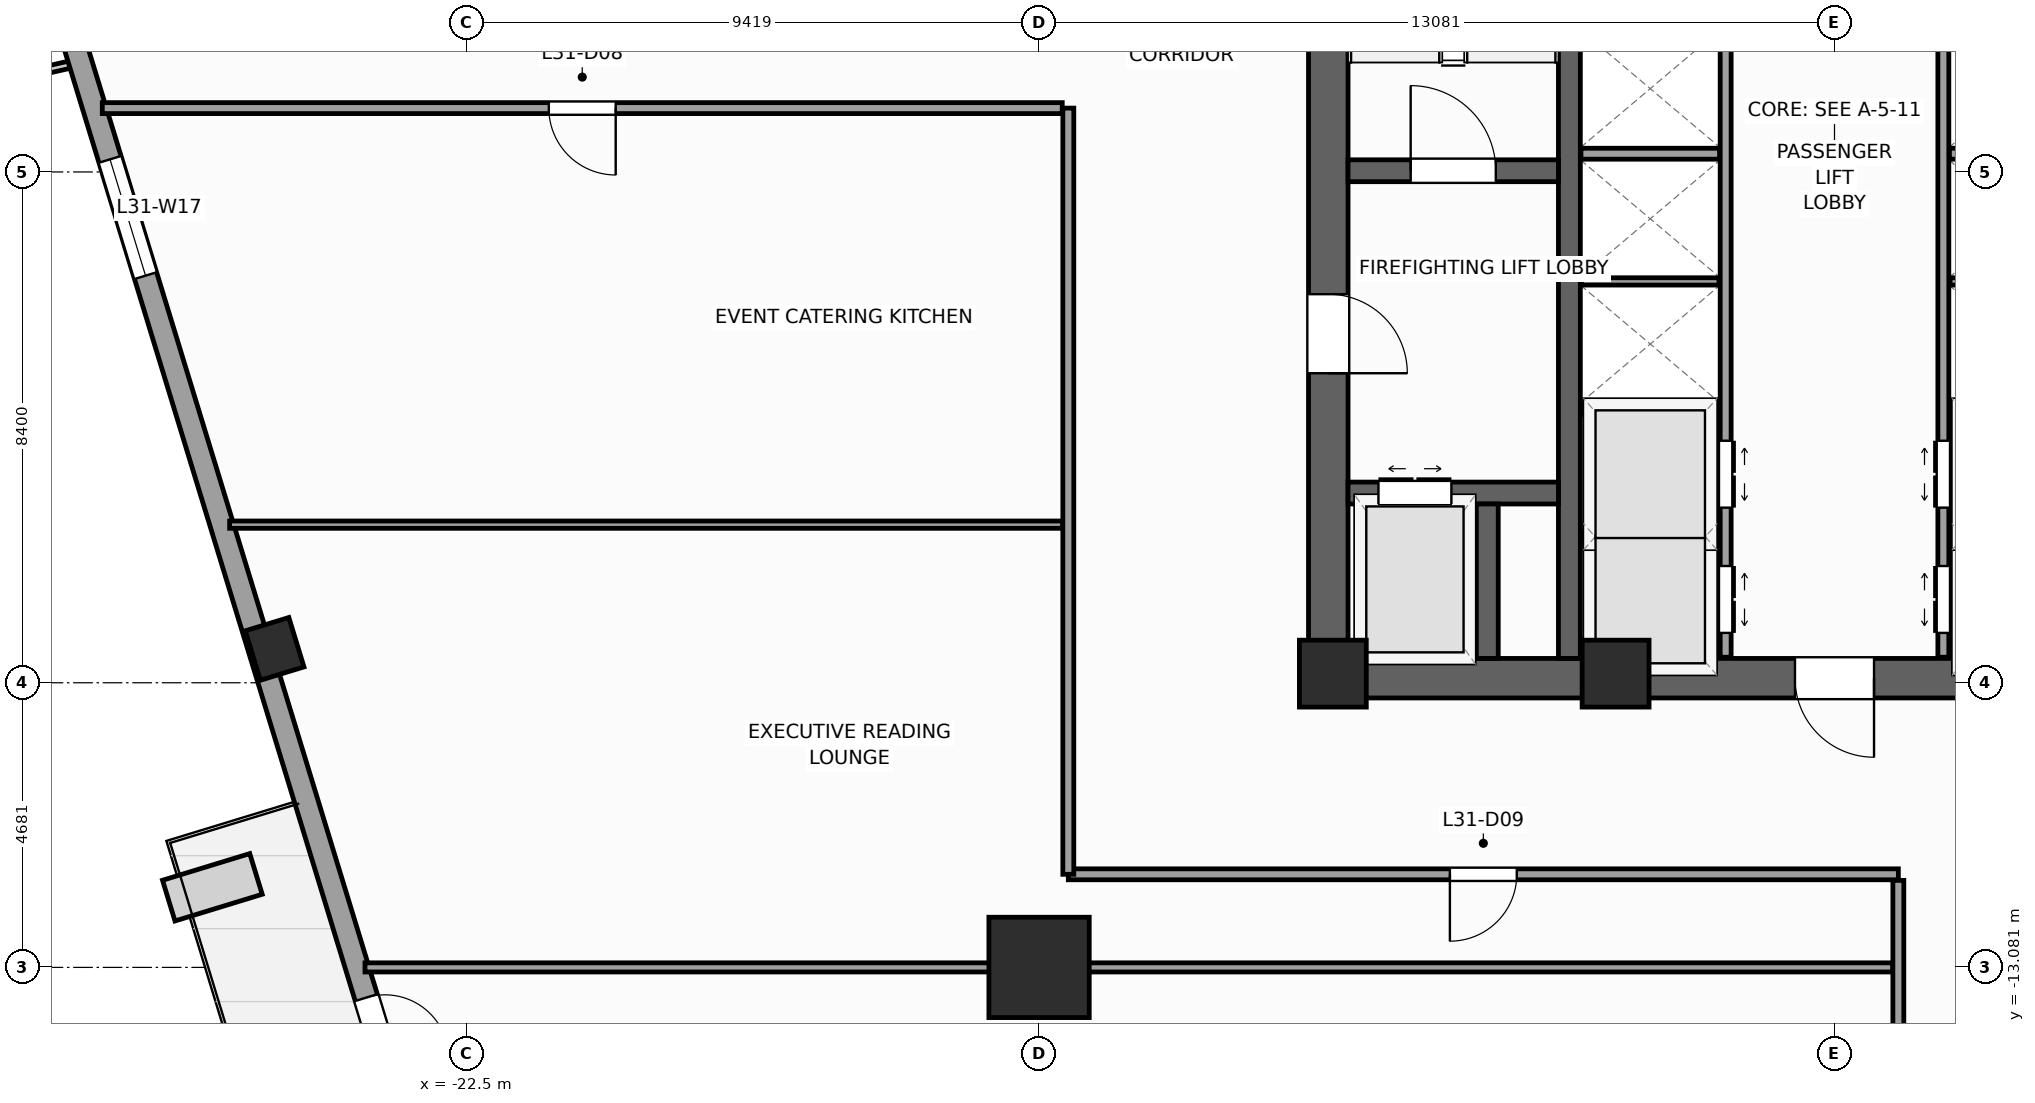
"""IFC4 building model, lengths in metres.
Left out: names, types, materials, properties, quantities, classifications, styles, units other than length and angle.
Written with IfcOpenShell. Run it as: python <this file> out.ifc"""

import sys

from ifc_helpers import new_model, si_unit, direction, frame, frame_2d, origin, origin_2d, place, context, subcontext, project, spatial, rectangle, extrude, source, transform, mapped, element, fill, save


model = new_model("IFC4")
c1 = context("Model", 3, precision=1e-05, world=origin(), true_north=direction((0.0, 1.0)))
c2 = subcontext(c1, "Body", "Model", "MODEL_VIEW")
j1 = project(units=[si_unit("LENGTHUNIT", "METRE"), si_unit("PLANEANGLEUNIT", "RADIAN")], contexts=[c1])
p1 = place(None, origin())
s1 = spatial("IfcSite", under=j1, at=p1, CompositionType="ELEMENT")
p2 = place(p1, origin())
s2 = spatial("IfcBuilding", under=s1, at=p2, CompositionType="ELEMENT")
p3 = place(p2, frame((0.0, 0.0, 131.2)))
s3 = spatial("IfcBuildingStorey", under=s2, at=p3, CompositionType="ELEMENT", Elevation=131.2)
p4 = place(p3, frame((-8.65, -8.325, 0.0), z_axis=(0.0, 0.0, 1.0), x_axis=(1.0, 0.0, 0.0)))
e1 = element("IfcWall", 1, at=p4, inside=s3, PredefinedType="SHEAR", context=c2, shape_type="SweptSolid", body=[
    extrude(rectangle(XDim=17.3, YDim=0.65, at=frame_2d((8.65, 0.0))), origin(), (0.0, 0.0, 1.0), 4.0),
])
p5 = place(p4, frame((8.0, 0.0, 0.0)))
e2 = element("IfcOpeningElement", 2, at=p5, cuts=e1, PredefinedType="OPENING", context=c2, shape_type="SweptSolid", body=[
    extrude(rectangle(XDim=1.3, YDim=2.2, at=frame_2d((0.65, 1.1))), frame((0.0, 0.335, 0.0), z_axis=(0.0, -1.0, 0.0), x_axis=(1.0, 0.0, 0.0)), (0.0, 0.0, 1.0), 0.67),
])
p6 = place(p3, frame((-8.325, -8.0, 0.0), z_axis=(0.0, 0.0, 1.0), x_axis=(0.0, 1.0, 0.0)))
e3 = element("IfcWall", 3, at=p6, inside=s3, PredefinedType="SHEAR", context=c2, shape_type="SweptSolid", body=[
    extrude(rectangle(XDim=16.0, YDim=0.65, at=frame_2d((8.0, 0.0))), origin(), (0.0, 0.0, 1.0), 4.0),
])
p7 = place(p6, frame((4.69, 0.0, 0.0)))
e4 = element("IfcOpeningElement", 4, at=p7, cuts=e3, PredefinedType="OPENING", context=c2, shape_type="SweptSolid", body=[
    extrude(rectangle(XDim=1.3, YDim=2.2, at=frame_2d((0.65, 1.1))), frame((0.0, 0.335, 0.0), z_axis=(0.0, -1.0, 0.0), x_axis=(1.0, 0.0, 0.0)), (0.0, 0.0, 1.0), 0.67),
])
p8 = place(p3, frame((-4.36, -8.0, 0.0), z_axis=(0.0, 0.0, 1.0), x_axis=(0.0, 1.0, 0.0)))
e5 = element("IfcWall", 5, at=p8, inside=s3, PredefinedType="SHEAR", context=c2, shape_type="SweptSolid", body=[
    extrude(rectangle(XDim=16.0, YDim=0.36, at=frame_2d((8.0, 0.0))), origin(), (0.0, 0.0, 1.0), 4.0),
])
p9 = place(p3, frame((-8.0, 0.02, 0.0), z_axis=(0.0, 0.0, 1.0), x_axis=(1.0, 0.0, 0.0)))
e6 = element("IfcWall", 6, at=p9, inside=s3, PredefinedType="SHEAR", context=c2, shape_type="SweptSolid", body=[
    extrude(rectangle(XDim=3.46, YDim=0.36, at=frame_2d((1.73, 0.0))), origin(), (0.0, 0.0, 1.0), 4.0),
])
p10 = place(p9, frame((1.03, 0.0, 0.0)))
e7 = element("IfcOpeningElement", 7, at=p10, cuts=e6, PredefinedType="OPENING", context=c2, shape_type="SweptSolid", body=[
    extrude(rectangle(XDim=1.4, YDim=2.2, at=frame_2d((0.7, 1.1))), frame((0.0, 0.19, 0.0), z_axis=(0.0, -1.0, 0.0), x_axis=(1.0, 0.0, 0.0)), (0.0, 0.0, 1.0), 0.38),
])
p11 = place(p3, frame((-8.0, -5.28, 0.0), z_axis=(0.0, 0.0, 1.0), x_axis=(1.0, 0.0, 0.0)))
e8 = element("IfcWall", 8, at=p11, inside=s3, PredefinedType="SHEAR", context=c2, shape_type="SweptSolid", body=[
    extrude(rectangle(XDim=3.46, YDim=0.36, at=frame_2d((1.73, 0.0))), origin(), (0.0, 0.0, 1.0), 4.0),
])
p12 = place(p11, frame((0.5, 0.0, 0.0)))
e9 = element("IfcOpeningElement", 9, at=p12, cuts=e8, PredefinedType="OPENING", context=c2, shape_type="SweptSolid", body=[
    extrude(rectangle(XDim=1.2, YDim=2.25, at=frame_2d((0.6, 1.125))), frame((0.0, 0.19, 0.0), z_axis=(0.0, -1.0, 0.0), x_axis=(1.0, 0.0, 0.0)), (0.0, 0.0, 1.0), 0.38),
])
p13 = place(p3, frame((-5.71, -8.0, 0.0), z_axis=(0.0, 0.0, 1.0), x_axis=(0.0, 1.0, 0.0)))
e10 = element("IfcWall", 10, at=p13, inside=s3, PredefinedType="SHEAR", context=c2, shape_type="SweptSolid", body=[
    extrude(rectangle(XDim=2.54, YDim=0.36, at=frame_2d((1.27, 0.0))), origin(), (0.0, 0.0, 1.0), 4.0),
])
m1 = source(origin(), c2, "Body", "SweptSolid", [
    extrude(rectangle(XDim=1.1, YDim=1.1, at=origin_2d()), origin(), (0.0, 0.0, 1.0), 4.0),
])
for number, where, z_axis, x_axis in (
    (11, (-8.25, -8.25, 0.0), (0.0, 0.0, 1.0), (1.0, 0.0, 0.0)),
    (12, (-3.6, -8.25, 0.0), (0.0, 0.0, 1.0), (1.0, 0.0, 0.0)),
):
    element("IfcColumn", number, at=place(p3, frame(where, z_axis=z_axis, x_axis=x_axis)), inside=s3, PredefinedType="PILASTER", context=c2, shape_type="MappedRepresentation", body=[
        mapped(m1, transform((0.0, 0.0, 0.0), scale=1.0)),
    ])
m2 = source(origin(), c2, "Body", "SweptSolid", [
    extrude(rectangle(XDim=1.65, YDim=1.65, at=origin_2d()), origin(), (0.0, 0.0, 1.0), 4.0),
])
p14 = place(p3, frame((-13.081, -13.081, 0.0), z_axis=(0.0, 0.0, 1.0), x_axis=(1.0, 0.0, 0.0)))
e13 = element("IfcColumn", 13, at=p14, inside=s3, PredefinedType="COLUMN", context=c2, shape_type="MappedRepresentation", body=[
    mapped(m2, transform((0.0, 0.0, 0.0), scale=1.0)),
])
m3 = source(origin(), c2, "Body", "SweptSolid", [
    extrude(rectangle(XDim=0.75, YDim=0.85, at=origin_2d()), origin(), (0.0, 0.0, 1.0), 4.0),
])
p15 = place(p3, frame((-25.653, -7.843, 0.0), z_axis=(0.0, 0.0, 1.0), x_axis=(0.956304755963, 0.292371704723, 0.0)))
e14 = element("IfcColumn", 14, at=p15, inside=s3, PredefinedType="COLUMN", context=c2, shape_type="MappedRepresentation", body=[
    mapped(m3, transform((0.0, 0.0, 0.0), scale=1.0)),
])
p16 = place(p3, frame((-32.658, 14.265, 0.0), z_axis=(0.0, 0.0, 1.0), x_axis=(0.292373127906, -0.956304320851, 0.0)))
e15 = element("IfcWall", 15, at=p16, inside=s3, PredefinedType="STANDARD", context=c2, shape_type="SweptSolid", body=[
    extrude(rectangle(XDim=46.38, YDim=0.38, at=frame_2d((23.19, 0.0))), origin(), (0.0, 0.0, 1.0), 3.14),
])
p17 = place(p16, frame((29.115, 0.0, 0.0)))
e16 = element("IfcOpeningElement", 16, at=p17, cuts=e15, PredefinedType="OPENING", context=c2, shape_type="SweptSolid", body=[
    extrude(rectangle(XDim=1.05, YDim=2.25, at=frame_2d((0.525, 1.125))), frame((0.0, 0.2, 0.0), z_axis=(0.0, -1.0, 0.0), x_axis=(1.0, 0.0, 0.0)), (0.0, 0.0, 1.0), 0.4),
])
p18 = place(p16, frame((4.865, 0.0, 0.51)))
e17 = element("IfcOpeningElement", 17, at=p18, cuts=e15, PredefinedType="OPENING", context=c2, shape_type="SweptSolid", body=[
    extrude(rectangle(XDim=1.4, YDim=2.4, at=frame_2d((0.7, 1.2))), frame((0.0, 0.2, 0.0), z_axis=(0.0, -1.0, 0.0), x_axis=(1.0, 0.0, 0.0)), (0.0, 0.0, 1.0), 0.4),
])
p19 = place(p16, frame((14.7, 0.0, 0.51)))
e18 = element("IfcOpeningElement", 18, at=p19, cuts=e15, PredefinedType="OPENING", context=c2, shape_type="SweptSolid", body=[
    extrude(rectangle(XDim=2.0, YDim=2.4, at=frame_2d((1.0, 1.2))), frame((0.0, 0.2, 0.0), z_axis=(0.0, -1.0, 0.0), x_axis=(1.0, 0.0, 0.0)), (0.0, 0.0, 1.0), 0.4),
])
p20 = place(p16, frame((31.288, 0.0, 0.51)))
e19 = element("IfcOpeningElement", 19, at=p20, cuts=e15, PredefinedType="OPENING", context=c2, shape_type="SweptSolid", body=[
    extrude(rectangle(XDim=2.0, YDim=2.4, at=frame_2d((1.0, 1.2))), frame((0.0, 0.2, 0.0), z_axis=(0.0, -1.0, 0.0), x_axis=(1.0, 0.0, 0.0)), (0.0, 0.0, 1.0), 0.4),
])
p21 = place(p16, frame((39.187, 0.0, 0.51)))
e20 = element("IfcOpeningElement", 20, at=p21, cuts=e15, PredefinedType="OPENING", context=c2, shape_type="SweptSolid", body=[
    extrude(rectangle(XDim=1.4, YDim=2.4, at=frame_2d((0.7, 1.2))), frame((0.0, 0.2, 0.0), z_axis=(0.0, -1.0, 0.0), x_axis=(1.0, 0.0, 0.0)), (0.0, 0.0, 1.0), 0.4),
])
p22 = place(p3, frame((-1.79, -7.98, 0.0), z_axis=(0.0, 0.0, 1.0), x_axis=(0.0, 1.0, 0.0)))
e21 = element("IfcWall", 21, at=p22, inside=s3, PredefinedType="PARTITIONING", context=c2, shape_type="SweptSolid", body=[
    extrude(rectangle(XDim=12.38, YDim=0.18, at=frame_2d((6.19, 0.0))), origin(), (0.0, 0.0, 1.0), 3.74),
])
p23 = place(p22, frame((0.4, 0.0, 0.0)))
e22 = element("IfcOpeningElement", 22, at=p23, cuts=e21, PredefinedType="OPENING", context=c2, shape_type="SweptSolid", body=[
    extrude(rectangle(XDim=1.1, YDim=2.2, at=frame_2d((0.55, 1.1))), frame((0.0, 0.1, 0.0), z_axis=(0.0, -1.0, 0.0), x_axis=(1.0, 0.0, 0.0)), (0.0, 0.0, 1.0), 0.2),
])
p24 = place(p22, frame((2.46, 0.0, 0.0)))
e23 = element("IfcOpeningElement", 23, at=p24, cuts=e21, PredefinedType="OPENING", context=c2, shape_type="SweptSolid", body=[
    extrude(rectangle(XDim=1.1, YDim=2.2, at=frame_2d((0.55, 1.1))), frame((0.0, 0.1, 0.0), z_axis=(0.0, -1.0, 0.0), x_axis=(1.0, 0.0, 0.0)), (0.0, 0.0, 1.0), 0.2),
])
p25 = place(p3, frame((1.79, -7.98, 0.0), z_axis=(0.0, 0.0, 1.0), x_axis=(0.0, 1.0, 0.0)))
e24 = element("IfcWall", 24, at=p25, inside=s3, PredefinedType="PARTITIONING", context=c2, shape_type="SweptSolid", body=[
    extrude(rectangle(XDim=12.38, YDim=0.18, at=frame_2d((6.19, 0.0))), origin(), (0.0, 0.0, 1.0), 3.74),
])
p26 = place(p25, frame((0.4, 0.0, 0.0)))
e25 = element("IfcOpeningElement", 25, at=p26, cuts=e24, PredefinedType="OPENING", context=c2, shape_type="SweptSolid", body=[
    extrude(rectangle(XDim=1.1, YDim=2.2, at=frame_2d((0.55, 1.1))), frame((0.0, 0.1, 0.0), z_axis=(0.0, -1.0, 0.0), x_axis=(1.0, 0.0, 0.0)), (0.0, 0.0, 1.0), 0.2),
])
p27 = place(p25, frame((2.46, 0.0, 0.0)))
e26 = element("IfcOpeningElement", 26, at=p27, cuts=e24, PredefinedType="OPENING", context=c2, shape_type="SweptSolid", body=[
    extrude(rectangle(XDim=1.1, YDim=2.2, at=frame_2d((0.55, 1.1))), frame((0.0, 0.1, 0.0), z_axis=(0.0, -1.0, 0.0), x_axis=(1.0, 0.0, 0.0)), (0.0, 0.0, 1.0), 0.2),
])
for number, where, z_axis, x_axis in (
    (27, (-4.17, -3.9, 0.0), (0.0, 0.0, 1.0), (1.0, 0.0, 0.0)),
    (28, (1.89, -3.9, 0.0), (0.0, 0.0, 1.0), (1.0, 0.0, 0.0)),
    (29, (-4.17, 0.3, 0.0), (0.0, 0.0, 1.0), (1.0, 0.0, 0.0)),
    (30, (1.89, 0.3, 0.0), (0.0, 0.0, 1.0), (1.0, 0.0, 0.0)),
):
    element("IfcWall", number, at=place(p3, frame(where, z_axis=z_axis, x_axis=x_axis)), inside=s3, PredefinedType="PARTITIONING", context=c2, shape_type="SweptSolid", body=[
        extrude(rectangle(XDim=2.28, YDim=0.18, at=frame_2d((1.14, 0.0))), origin(), (0.0, 0.0, 1.0), 3.74),
    ])
for number, where, z_axis, x_axis in (
    (31, (-4.16, -6.0, 0.0), (0.0, 0.0, 1.0), (1.0, 0.0, 0.0)),
    (32, (1.9, -6.0, 0.0), (0.0, 0.0, 1.0), (1.0, 0.0, 0.0)),
    (33, (-4.16, -1.8, 0.0), (0.0, 0.0, 1.0), (1.0, 0.0, 0.0)),
    (34, (1.9, -1.8, 0.0), (0.0, 0.0, 1.0), (1.0, 0.0, 0.0)),
):
    element("IfcWall", number, at=place(p3, frame(where, z_axis=z_axis, x_axis=x_axis)), inside=s3, PredefinedType="PARTITIONING", context=c2, shape_type="SweptSolid", body=[
        extrude(rectangle(XDim=2.26, YDim=0.12, at=frame_2d((1.13, 0.0))), origin(), (0.0, 0.0, 1.0), 3.74),
    ])
p28 = place(p3, frame((-12.6, -11.55, 0.0), z_axis=(0.0, 0.0, 1.0), x_axis=(1.0, 0.0, 0.0)))
e35 = element("IfcWall", 35, at=p28, inside=s3, PredefinedType="PARTITIONING", context=c2, shape_type="SweptSolid", body=[
    extrude(rectangle(XDim=13.65, YDim=0.18, at=frame_2d((6.825, 0.0))), origin(), (0.0, 0.0, 1.0), 3.74),
])
p29 = place(p28, frame((6.275, 0.0, 0.0)))
e36 = element("IfcOpeningElement", 36, at=p29, cuts=e35, PredefinedType="OPENING", context=c2, shape_type="SweptSolid", body=[
    extrude(rectangle(XDim=1.1, YDim=2.2, at=frame_2d((0.55, 1.1))), frame((0.0, 0.1, 0.0), z_axis=(0.0, -1.0, 0.0), x_axis=(1.0, 0.0, 0.0)), (0.0, 0.0, 1.0), 0.2),
])
p30 = place(p3, frame((-12.6, -11.55, 0.0), z_axis=(0.0, 0.0, 1.0), x_axis=(0.0, 1.0, 0.0)))
e37 = element("IfcWall", 37, at=p30, inside=s3, PredefinedType="PARTITIONING", context=c2, shape_type="SweptSolid", body=[
    extrude(rectangle(XDim=12.6, YDim=0.18, at=frame_2d((6.3, 0.0))), origin(), (0.0, 0.0, 1.0), 3.74),
])
p31 = place(p3, frame((-28.487, 1.05, 0.0), z_axis=(0.0, 0.0, 1.0), x_axis=(1.0, 0.0, 0.0)))
e38 = element("IfcWall", 38, at=p31, inside=s3, PredefinedType="PARTITIONING", context=c2, shape_type="SweptSolid", body=[
    extrude(rectangle(XDim=15.787, YDim=0.18, at=frame_2d((7.894, 0.0))), origin(), (0.0, 0.0, 1.0), 3.74),
])
p32 = place(p31, frame((7.343, 0.0, 0.0)))
e39 = element("IfcOpeningElement", 39, at=p32, cuts=e38, PredefinedType="OPENING", context=c2, shape_type="SweptSolid", body=[
    extrude(rectangle(XDim=1.1, YDim=2.2, at=frame_2d((0.55, 1.1))), frame((0.0, 0.1, 0.0), z_axis=(0.0, -1.0, 0.0), x_axis=(1.0, 0.0, 0.0)), (0.0, 0.0, 1.0), 0.2),
])
p33 = place(p3, frame((1.05, -27.845, 0.0), z_axis=(0.0, 0.0, 1.0), x_axis=(0.0, 1.0, 0.0)))
e40 = element("IfcWall", 40, at=p33, inside=s3, PredefinedType="PARTITIONING", context=c2, shape_type="SweptSolid", body=[
    extrude(rectangle(XDim=16.195, YDim=0.18, at=frame_2d((8.097, 0.0))), origin(), (0.0, 0.0, 1.0), 3.74),
])
p34 = place(p33, frame((6.996, 0.0, 0.0)))
e41 = element("IfcOpeningElement", 41, at=p34, cuts=e40, PredefinedType="OPENING", context=c2, shape_type="SweptSolid", body=[
    extrude(rectangle(XDim=1.1, YDim=2.2, at=frame_2d((0.55, 1.1))), frame((0.0, 0.1, 0.0), z_axis=(0.0, -1.0, 0.0), x_axis=(1.0, 0.0, 0.0)), (0.0, 0.0, 1.0), 0.2),
])
p35 = place(p3, frame((-24.167, -13.081, 0.0), z_axis=(0.0, 0.0, 1.0), x_axis=(1.0, 0.0, 0.0)))
e42 = element("IfcWall", 42, at=p35, inside=s3, PredefinedType="PARTITIONING", context=c2, shape_type="SweptSolid", body=[
    extrude(rectangle(XDim=25.122, YDim=0.15, at=frame_2d((12.561, 0.0))), origin(), (0.0, 0.0, 1.0), 2.732),
])
p36 = place(p3, frame((-26.393, -5.8, 0.0), z_axis=(0.0, 0.0, 1.0), x_axis=(1.0, 0.0, 0.0)))
e43 = element("IfcWall", 43, at=p36, inside=s3, PredefinedType="PARTITIONING", context=c2, shape_type="SweptSolid", body=[
    extrude(rectangle(XDim=13.698, YDim=0.12, at=frame_2d((6.849, 0.0))), origin(), (0.0, 0.0, 1.0), 3.74),
])
m4 = source(origin(), c2, "Body", "SweptSolid", [
    extrude(rectangle(XDim=1.05, YDim=2.25, at=frame_2d((0.525, 1.125))), frame((0.0, 0.025, 0.0), z_axis=(0.0, -1.0, 0.0), x_axis=(1.0, 0.0, 0.0)), (0.0, 0.0, 1.0), 0.05),
])
p37 = place(p17, origin())
e44 = element("IfcDoor", 44, at=p37, inside=s3, OperationType="SINGLE_SWING_RIGHT", PredefinedType="DOOR", context=c2, shape_type="MappedRepresentation", body=[
    mapped(m4, transform((0.0, 0.0, 0.0), scale=1.0)),
])
fill(e16, e44)
m5 = source(origin(), c2, "Body", "SweptSolid", [
    extrude(rectangle(XDim=2.0, YDim=2.4, at=frame_2d((1.0, 1.2))), frame((0.0, 0.03, 0.0), z_axis=(0.0, -1.0, 0.0), x_axis=(1.0, 0.0, 0.0)), (0.0, 0.0, 1.0), 0.06),
])
p38 = place(p19, origin())
e45 = element("IfcWindow", 45, at=p38, inside=s3, PartitioningType="SINGLE_PANEL", PredefinedType="WINDOW", context=c2, shape_type="MappedRepresentation", body=[
    mapped(m5, transform((0.0, 0.0, 0.0), scale=1.0)),
])
fill(e18, e45)
m6 = source(origin(), c2, "Body", "SweptSolid", [
    extrude(rectangle(XDim=1.4, YDim=2.2, at=frame_2d((0.7, 1.1))), frame((0.0, 0.025, 0.0), z_axis=(0.0, -1.0, 0.0), x_axis=(1.0, 0.0, 0.0)), (0.0, 0.0, 1.0), 0.05),
])
p39 = place(p10, origin())
e46 = element("IfcDoor", 46, at=p39, inside=s3, OperationType="SINGLE_SWING_LEFT", PredefinedType="DOOR", context=c2, shape_type="MappedRepresentation", body=[
    mapped(m6, transform((0.0, 0.0, 0.0), scale=1.0)),
])
fill(e7, e46)
m7 = source(origin(), c2, "Body", "SweptSolid", [
    extrude(rectangle(XDim=1.3, YDim=2.2, at=frame_2d((0.65, 1.1))), frame((0.0, 0.025, 0.0), z_axis=(0.0, -1.0, 0.0), x_axis=(1.0, 0.0, 0.0)), (0.0, 0.0, 1.0), 0.05),
])
p40 = place(p7, frame((1.3, 0.0, 0.0), z_axis=(0.0, 0.0, 1.0), x_axis=(-1.0, 0.0, 0.0)))
e47 = element("IfcDoor", 47, at=p40, inside=s3, OperationType="SINGLE_SWING_LEFT", PredefinedType="DOOR", context=c2, shape_type="MappedRepresentation", body=[
    mapped(m7, transform((0.0, 0.0, 0.0), scale=1.0)),
])
fill(e4, e47)
p41 = place(p5, frame((1.3, 0.0, 0.0), z_axis=(0.0, 0.0, 1.0), x_axis=(-1.0, 0.0, 0.0)))
e48 = element("IfcDoor", 48, at=p41, inside=s3, OperationType="SINGLE_SWING_RIGHT", PredefinedType="DOOR", context=c2, shape_type="MappedRepresentation", body=[
    mapped(m7, transform((0.0, 0.0, 0.0), scale=1.0)),
])
fill(e2, e48)
m8 = source(origin(), c2, "Body", "SweptSolid", [
    extrude(rectangle(XDim=1.2, YDim=2.25, at=frame_2d((0.6, 1.125))), frame((0.0, 0.025, 0.0), z_axis=(0.0, -1.0, 0.0), x_axis=(1.0, 0.0, 0.0)), (0.0, 0.0, 1.0), 0.05),
])
p42 = place(p12, origin())
e49 = element("IfcDoor", 49, at=p42, inside=s3, OperationType="DOUBLE_DOOR_SLIDING", PredefinedType="DOOR", context=c2, shape_type="MappedRepresentation", body=[
    mapped(m8, transform((0.0, 0.0, 0.0), scale=1.0)),
])
fill(e9, e49)
m9 = source(origin(), c2, "Body", "SweptSolid", [
    extrude(rectangle(XDim=1.1, YDim=2.2, at=frame_2d((0.55, 1.1))), frame((0.0, 0.025, 0.0), z_axis=(0.0, -1.0, 0.0), x_axis=(1.0, 0.0, 0.0)), (0.0, 0.0, 1.0), 0.05),
])
p43 = place(p23, frame((1.1, 0.0, 0.0), z_axis=(0.0, 0.0, 1.0), x_axis=(-1.0, 0.0, 0.0)))
e50 = element("IfcDoor", 50, at=p43, inside=s3, OperationType="DOUBLE_DOOR_SLIDING", PredefinedType="DOOR", context=c2, shape_type="MappedRepresentation", body=[
    mapped(m9, transform((0.0, 0.0, 0.0), scale=1.0)),
])
fill(e22, e50)
p44 = place(p24, frame((1.1, 0.0, 0.0), z_axis=(0.0, 0.0, 1.0), x_axis=(-1.0, 0.0, 0.0)))
e51 = element("IfcDoor", 51, at=p44, inside=s3, OperationType="DOUBLE_DOOR_SLIDING", PredefinedType="DOOR", context=c2, shape_type="MappedRepresentation", body=[
    mapped(m9, transform((0.0, 0.0, 0.0), scale=1.0)),
])
fill(e23, e51)
p45 = place(p26, origin())
e52 = element("IfcDoor", 52, at=p45, inside=s3, OperationType="DOUBLE_DOOR_SLIDING", PredefinedType="DOOR", context=c2, shape_type="MappedRepresentation", body=[
    mapped(m9, transform((0.0, 0.0, 0.0), scale=1.0)),
])
fill(e25, e52)
p46 = place(p27, origin())
e53 = element("IfcDoor", 53, at=p46, inside=s3, OperationType="DOUBLE_DOOR_SLIDING", PredefinedType="DOOR", context=c2, shape_type="MappedRepresentation", body=[
    mapped(m9, transform((0.0, 0.0, 0.0), scale=1.0)),
])
fill(e26, e53)
p47 = place(p32, frame((1.1, 0.0, 0.0), z_axis=(0.0, 0.0, 1.0), x_axis=(-1.0, 0.0, 0.0)))
e54 = element("IfcDoor", 54, at=p47, inside=s3, OperationType="SINGLE_SWING_RIGHT", PredefinedType="DOOR", context=c2, shape_type="MappedRepresentation", body=[
    mapped(m9, transform((0.0, 0.0, 0.0), scale=1.0)),
])
fill(e39, e54)
p48 = place(p29, frame((1.1, 0.0, 0.0), z_axis=(0.0, 0.0, 1.0), x_axis=(-1.0, 0.0, 0.0)))
e55 = element("IfcDoor", 55, at=p48, inside=s3, OperationType="SINGLE_SWING_LEFT", PredefinedType="DOOR", context=c2, shape_type="MappedRepresentation", body=[
    mapped(m9, transform((0.0, 0.0, 0.0), scale=1.0)),
])
fill(e36, e55)
save(model, sys.argv[1])
